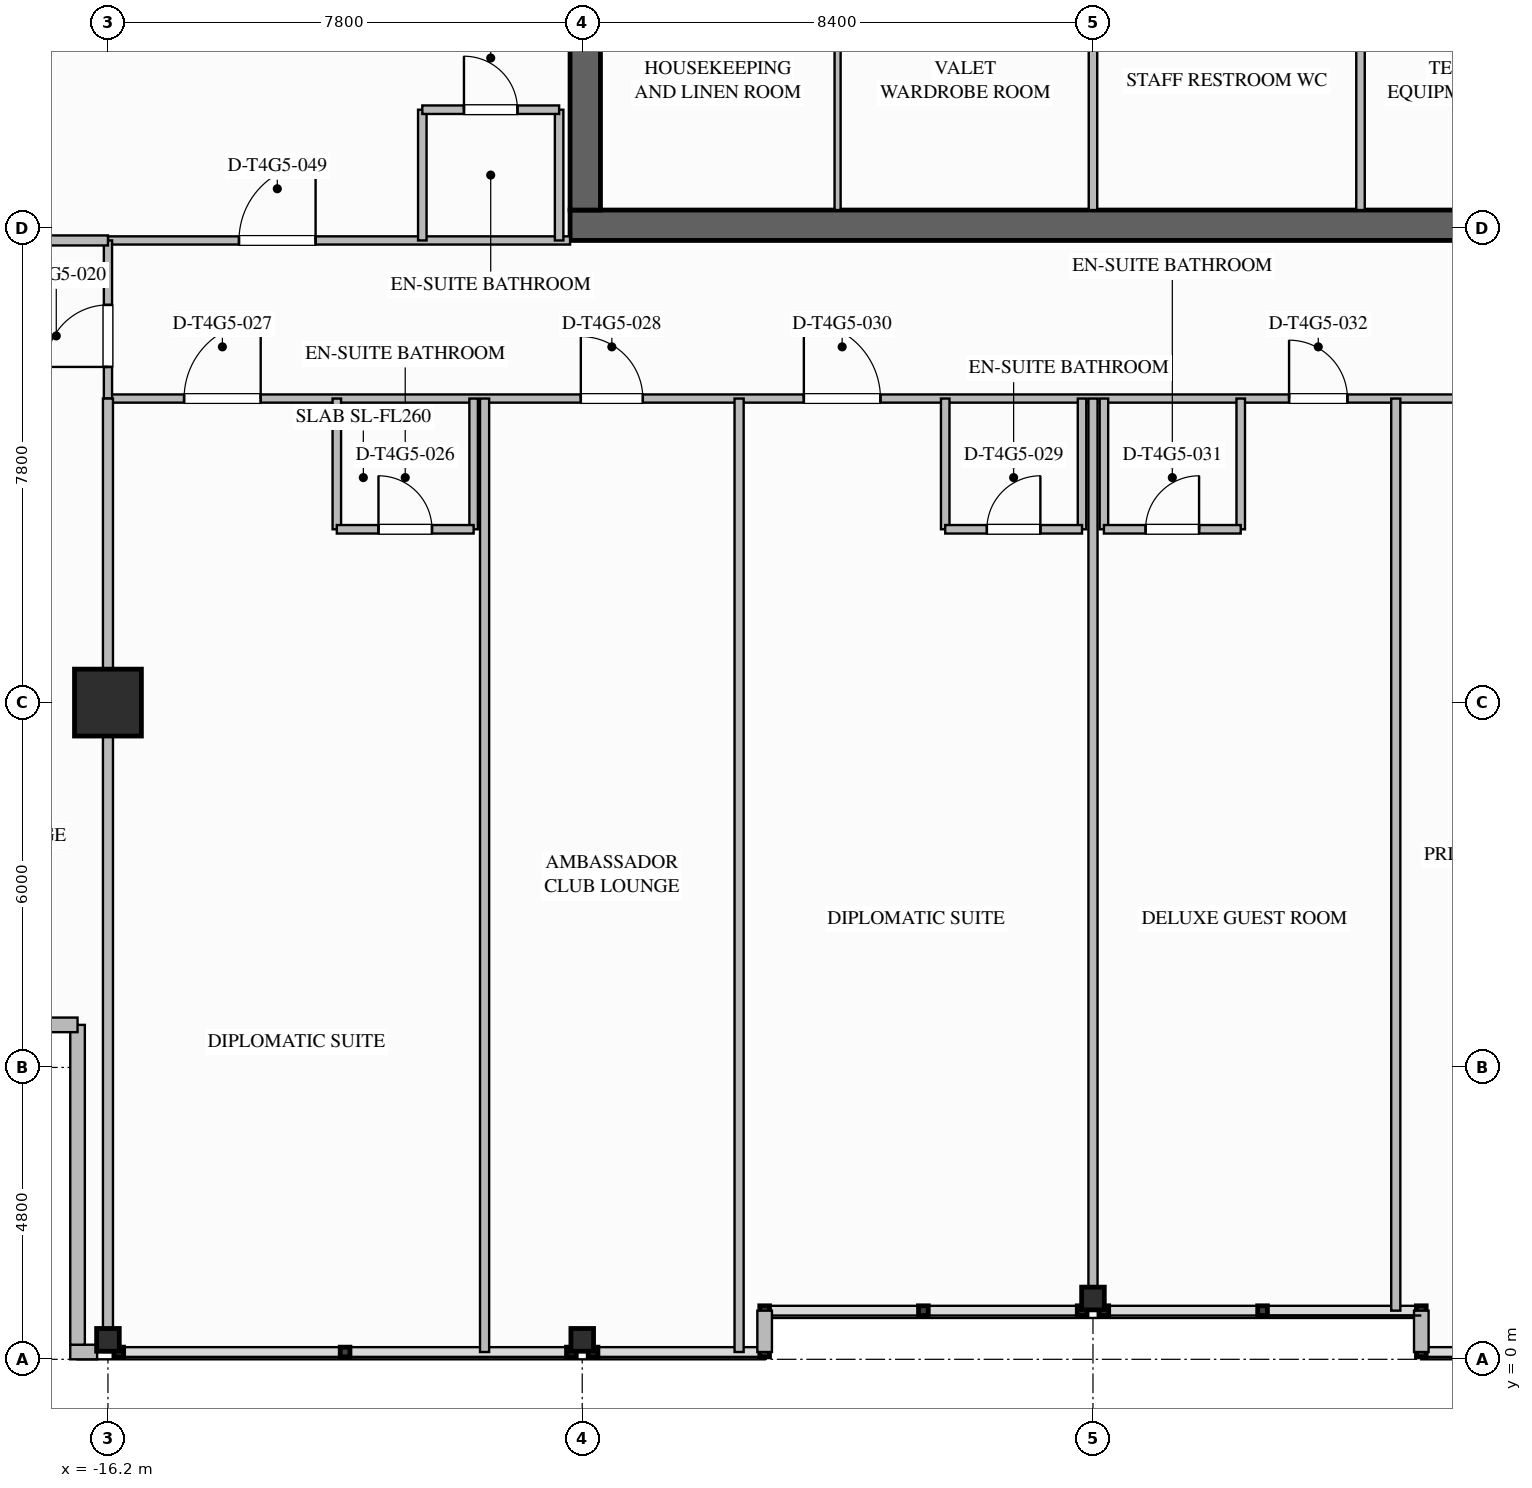
"""IFC4 building model, lengths in metres.
Left out: names, types, materials, properties, quantities, classifications, styles, units other than length and angle.
Written with IfcOpenShell. Run it as: python <this file> out.ifc"""

import sys

from ifc_helpers import new_model, si_unit, direction, frame, frame_2d, origin, origin_2d, place, context, subcontext, project, spatial, rectangle, i_section, extrude, element, fill, save


model = new_model("IFC4")
c1 = context("Model", 3, precision=1e-05, world=origin(), true_north=direction((0.0, 1.0)))
c2 = subcontext(c1, "Body", "Model", "MODEL_VIEW")
j1 = project(units=[si_unit("LENGTHUNIT", "METRE"), si_unit("PLANEANGLEUNIT", "RADIAN")], contexts=[c1])
p1 = place(None, origin())
s1 = spatial("IfcSite", under=j1, at=p1, CompositionType="ELEMENT")
p2 = place(p1, origin())
s2 = spatial("IfcBuilding", under=s1, at=p2, CompositionType="ELEMENT")
p3 = place(p2, frame((0.0, 0.0, 248.3)))
s3 = spatial("IfcBuildingStorey", under=s2, at=p3, CompositionType="ELEMENT", Elevation=248.3)
p4 = place(p3, frame((8.6, 18.65, 0.0), z_axis=(0.0, 0.0, 1.0), x_axis=(-1.0, 0.0, 0.0)))
e1 = element("IfcWall", 1, at=p4, inside=s3, PredefinedType="SHEAR", context=c2, shape_type="SweptSolid", body=[
    extrude(rectangle(XDim=17.2, YDim=0.5, at=frame_2d((8.6, 0.0))), origin(), (0.0, 0.0, 1.0), 3.6),
])
p5 = place(p3, frame((-8.35, 18.9, 0.0), z_axis=(0.0, 0.0, 1.0), x_axis=(0.0, 1.0, 0.0)))
e2 = element("IfcWall", 2, at=p5, inside=s3, PredefinedType="SHEAR", context=c2, shape_type="SweptSolid", body=[
    extrude(rectangle(XDim=16.2, YDim=0.5, at=frame_2d((8.1, 0.0))), origin(), (0.0, 0.0, 1.0), 3.6),
])
p6 = place(p3, frame((-16.2, 10.8, 0.0), z_axis=(0.0, 0.0, 1.0), x_axis=(1.0, 0.0, 0.0)))
e3 = element("IfcColumn", 3, at=p6, inside=s3, PredefinedType="COLUMN", context=c2, shape_type="SweptSolid", body=[
    extrude(rectangle(XDim=1.1, YDim=1.1, at=origin_2d()), origin(), (0.0, 0.0, 1.0), 3.6),
])
for number, where, z_axis, x_axis in (
    (4, (-16.2, 0.32, 0.0), (0.0, 0.0, 1.0), (0.0, 1.0, 0.0)),
    (5, (-8.4, 0.32, 0.0), (0.0, 0.0, 1.0), (0.0, 1.0, 0.0)),
    (6, (0.0, 1.0, 0.0), (0.0, 0.0, 1.0), (0.0, 1.0, 0.0)),
):
    element("IfcColumn", number, at=place(p3, frame(where, z_axis=z_axis, x_axis=x_axis)), inside=s3, PredefinedType="COLUMN", context=c2, shape_type="SweptSolid", body=[
        extrude(i_section(OverallWidth=0.374, OverallDepth=0.372, WebThickness=0.016, FlangeThickness=0.026, FilletRadius=0.025, at=origin_2d()), origin(), (0.0, 0.0, 1.0), 3.597),
    ])
p7 = place(p3, frame((-16.378, 0.12, 0.0), z_axis=(0.0, 0.0, 1.0), x_axis=(-1.0, 0.0, 0.0)))
e7 = element("IfcWall", 7, at=p7, inside=s3, PredefinedType="STANDARD", context=c2, shape_type="SweptSolid", body=[
    extrude(rectangle(XDim=0.442, YDim=0.24, at=frame_2d((0.221, 0.0))), origin(), (0.0, 0.0, 1.0), 3.34),
])
p8 = place(p3, frame((-16.7, 0.24, 0.0), z_axis=(0.0, 0.0, 1.0), x_axis=(0.0, 1.0, 0.0)))
e8 = element("IfcWall", 8, at=p8, inside=s3, PredefinedType="STANDARD", context=c2, shape_type="SweptSolid", body=[
    extrude(rectangle(XDim=5.26, YDim=0.24, at=frame_2d((2.63, 0.0))), origin(), (0.0, 0.0, 1.0), 3.34),
])
p9 = place(p3, frame((-16.7, 5.5, 0.0), z_axis=(0.0, 0.0, 1.0), x_axis=(-1.0, 0.0, 0.0)))
e9 = element("IfcWall", 9, at=p9, inside=s3, PredefinedType="STANDARD", context=c2, shape_type="SweptSolid", body=[
    extrude(rectangle(XDim=5.38, YDim=0.24, at=frame_2d((2.69, 0.0))), origin(), (0.0, 0.0, 1.0), 3.34),
])
for number, where, z_axis, x_axis in (
    (10, (5.4, 0.12, 0.0), (0.0, 0.0, 1.0), (0.0, 1.0, 0.0)),
    (11, (-5.4, 0.8, 0.0), (0.0, 0.0, 1.0), (0.0, -1.0, 0.0)),
):
    element("IfcWall", number, at=place(p3, frame(where, z_axis=z_axis, x_axis=x_axis)), inside=s3, PredefinedType="STANDARD", context=c2, shape_type="SweptSolid", body=[
        extrude(rectangle(XDim=0.68, YDim=0.24, at=frame_2d((0.34, 0.0))), origin(), (0.0, 0.0, 1.0), 3.34),
    ])
p10 = place(p3, frame((-4.2, 18.9, 0.0), z_axis=(0.0, 0.0, 1.0), x_axis=(0.0, 1.0, 0.0)))
e12 = element("IfcWall", 12, at=p10, inside=s3, PredefinedType="PARTITIONING", context=c2, shape_type="SweptSolid", body=[
    extrude(rectangle(XDim=4.3, YDim=0.1, at=frame_2d((2.15, 0.0))), origin(), (0.0, 0.0, 1.0), 3.34),
])
for number, where, z_axis, x_axis in (
    (13, (0.0, 18.9, 0.0), (0.0, 0.0, 1.0), (0.0, 1.0, 0.0)),
    (14, (4.4, 18.9, 0.0), (0.0, 0.0, 1.0), (0.0, 1.0, 0.0)),
):
    element("IfcWall", number, at=place(p3, frame(where, z_axis=z_axis, x_axis=x_axis)), inside=s3, PredefinedType="PLUMBINGWALL", context=c2, shape_type="SweptSolid", body=[
        extrude(rectangle(XDim=4.3, YDim=0.14, at=frame_2d((2.15, 0.0))), origin(), (0.0, 0.0, 1.0), 3.34),
    ])
p11 = place(p3, frame((-16.2, 15.8, 0.0), z_axis=(0.0, 0.0, 1.0), x_axis=(1.0, 0.0, 0.0)))
e15 = element("IfcWall", 15, at=p11, inside=s3, PredefinedType="PARTITIONING", context=c2, shape_type="SweptSolid", body=[
    extrude(rectangle(XDim=38.28, YDim=0.135, at=frame_2d((19.14, 0.0))), origin(), (0.0, 0.0, 1.0), 3.34),
])
p12 = place(p11, frame((33.355, 0.0, 0.0)))
e16 = element("IfcOpeningElement", 16, at=p12, cuts=e15, PredefinedType="OPENING", context=c2, shape_type="SweptSolid", body=[
    extrude(rectangle(XDim=1.26, YDim=2.2, at=frame_2d((0.63, 1.1))), frame((0.0, 0.077, 0.0), z_axis=(0.0, -1.0, 0.0), x_axis=(1.0, 0.0, 0.0)), (0.0, 0.0, 1.0), 0.155),
])
p13 = place(p11, frame((1.252, 0.0, 0.0)))
e17 = element("IfcOpeningElement", 17, at=p13, cuts=e15, PredefinedType="OPENING", context=c2, shape_type="SweptSolid", body=[
    extrude(rectangle(XDim=1.26, YDim=2.2, at=frame_2d((0.63, 1.1))), frame((0.0, 0.077, 0.0), z_axis=(0.0, -1.0, 0.0), x_axis=(1.0, 0.0, 0.0)), (0.0, 0.0, 1.0), 0.155),
])
p14 = place(p11, frame((7.777, 0.0, 0.0)))
e18 = element("IfcOpeningElement", 18, at=p14, cuts=e15, PredefinedType="OPENING", context=c2, shape_type="SweptSolid", body=[
    extrude(rectangle(XDim=1.02, YDim=2.15, at=frame_2d((0.51, 1.075))), frame((0.0, 0.077, 0.0), z_axis=(0.0, -1.0, 0.0), x_axis=(1.0, 0.0, 0.0)), (0.0, 0.0, 1.0), 0.155),
])
p15 = place(p11, frame((11.445, 0.0, 0.0)))
e19 = element("IfcOpeningElement", 19, at=p15, cuts=e15, PredefinedType="OPENING", context=c2, shape_type="SweptSolid", body=[
    extrude(rectangle(XDim=1.26, YDim=2.2, at=frame_2d((0.63, 1.1))), frame((0.0, 0.077, 0.0), z_axis=(0.0, -1.0, 0.0), x_axis=(1.0, 0.0, 0.0)), (0.0, 0.0, 1.0), 0.155),
])
p16 = place(p11, frame((19.425, 0.0, 0.0)))
e20 = element("IfcOpeningElement", 20, at=p16, cuts=e15, PredefinedType="OPENING", context=c2, shape_type="SweptSolid", body=[
    extrude(rectangle(XDim=0.96, YDim=2.15, at=frame_2d((0.48, 1.075))), frame((0.0, 0.077, 0.0), z_axis=(0.0, -1.0, 0.0), x_axis=(1.0, 0.0, 0.0)), (0.0, 0.0, 1.0), 0.155),
])
p17 = place(p11, frame((23.183, 0.0, 0.0)))
e21 = element("IfcOpeningElement", 21, at=p17, cuts=e15, PredefinedType="OPENING", context=c2, shape_type="SweptSolid", body=[
    extrude(rectangle(XDim=1.02, YDim=2.15, at=frame_2d((0.51, 1.075))), frame((0.0, 0.077, 0.0), z_axis=(0.0, -1.0, 0.0), x_axis=(1.0, 0.0, 0.0)), (0.0, 0.0, 1.0), 0.155),
])
p18 = place(p11, frame((29.888, 0.0, 0.0)))
e22 = element("IfcOpeningElement", 22, at=p18, cuts=e15, PredefinedType="OPENING", context=c2, shape_type="SweptSolid", body=[
    extrude(rectangle(XDim=1.26, YDim=2.2, at=frame_2d((0.63, 1.1))), frame((0.0, 0.077, 0.0), z_axis=(0.0, -1.0, 0.0), x_axis=(1.0, 0.0, 0.0)), (0.0, 0.0, 1.0), 0.155),
])
p19 = place(p3, frame((-16.2, 18.4, 0.0), z_axis=(0.0, 0.0, 1.0), x_axis=(1.0, 0.0, 0.0)))
e23 = element("IfcWall", 23, at=p19, inside=s3, PredefinedType="PARTITIONING", context=c2, shape_type="SweptSolid", body=[
    extrude(rectangle(XDim=7.6, YDim=0.135, at=frame_2d((3.8, 0.0))), origin(), (0.0, 0.0, 1.0), 2.717),
])
p20 = place(p19, frame((2.155, 0.0, 0.0)))
e24 = element("IfcOpeningElement", 24, at=p20, cuts=e23, PredefinedType="OPENING", context=c2, shape_type="SweptSolid", body=[
    extrude(rectangle(XDim=1.26, YDim=2.2, at=frame_2d((0.63, 1.1))), frame((0.0, 0.077, 0.0), z_axis=(0.0, -1.0, 0.0), x_axis=(1.0, 0.0, 0.0)), (0.0, 0.0, 1.0), 0.155),
])
p21 = place(p3, frame((-16.2, 15.8, 0.0), z_axis=(0.0, 0.0, 1.0), x_axis=(0.0, 1.0, 0.0)))
e25 = element("IfcWall", 25, at=p21, inside=s3, PredefinedType="PARTITIONING", context=c2, shape_type="SweptSolid", body=[
    extrude(rectangle(XDim=2.6, YDim=0.135, at=frame_2d((1.3, 0.0))), origin(), (0.0, 0.0, 1.0), 2.714),
])
p22 = place(p21, frame((0.52, 0.0, 0.0)))
e26 = element("IfcOpeningElement", 26, at=p22, cuts=e25, PredefinedType="OPENING", context=c2, shape_type="SweptSolid", body=[
    extrude(rectangle(XDim=1.02, YDim=2.15, at=frame_2d((0.51, 1.075))), frame((0.0, 0.077, 0.0), z_axis=(0.0, -1.0, 0.0), x_axis=(1.0, 0.0, 0.0)), (0.0, 0.0, 1.0), 0.155),
])
p23 = place(p3, frame((-16.2, 0.12, 0.0), z_axis=(0.0, 0.0, 1.0), x_axis=(0.0, 1.0, 0.0)))
e27 = element("IfcWall", 27, at=p23, inside=s3, PredefinedType="PARTITIONING", context=c2, shape_type="SweptSolid", body=[
    extrude(rectangle(XDim=15.68, YDim=0.165, at=frame_2d((7.84, 0.0))), origin(), (0.0, 0.0, 1.0), 2.714),
])
p24 = place(p3, frame((-22.08, 18.4, 0.0), z_axis=(0.0, 0.0, 1.0), x_axis=(1.0, 0.0, 0.0)))
e28 = element("IfcWall", 28, at=p24, inside=s3, PredefinedType="PARTITIONING", context=c2, shape_type="SweptSolid", body=[
    extrude(rectangle(XDim=5.88, YDim=0.165, at=frame_2d((2.94, 0.0))), origin(), (0.0, 0.0, 1.0), 2.714),
])
p25 = place(p3, frame((-12.436, 15.8, 0.0), z_axis=(0.0, 0.0, 1.0), x_axis=(0.0, -1.0, 0.0)))
e29 = element("IfcWall", 29, at=p25, inside=s3, PredefinedType="PLUMBINGWALL", context=c2, shape_type="SweptSolid", body=[
    extrude(rectangle(XDim=2.15, YDim=0.14, at=frame_2d((1.075, 0.0))), origin(), (0.0, 0.0, 1.0), 2.918),
])
p26 = place(p3, frame((-10.186, 15.8, 0.0), z_axis=(0.0, 0.0, 1.0), x_axis=(0.0, -1.0, 0.0)))
e30 = element("IfcWall", 30, at=p26, inside=s3, PredefinedType="PLUMBINGWALL", context=c2, shape_type="SweptSolid", body=[
    extrude(rectangle(XDim=2.15, YDim=0.14, at=frame_2d((1.075, 0.0))), origin(), (0.0, 0.0, 1.0), 3.34),
])
p27 = place(p3, frame((-12.436, 13.65, 0.0), z_axis=(0.0, 0.0, 1.0), x_axis=(1.0, 0.0, 0.0)))
e31 = element("IfcWall", 31, at=p27, inside=s3, PredefinedType="PLUMBINGWALL", context=c2, shape_type="SweptSolid", body=[
    extrude(rectangle(XDim=2.25, YDim=0.14, at=frame_2d((1.125, 0.0))), origin(), (0.0, 0.0, 1.0), 3.34),
])
p28 = place(p27, frame((0.685, 0.0, 0.0)))
e32 = element("IfcOpeningElement", 32, at=p28, cuts=e31, PredefinedType="OPENING", context=c2, shape_type="SweptSolid", body=[
    extrude(rectangle(XDim=0.88, YDim=2.1, at=frame_2d((0.44, 1.05))), frame((0.0, 0.08, 0.0), z_axis=(0.0, -1.0, 0.0), x_axis=(1.0, 0.0, 0.0)), (0.0, 0.0, 1.0), 0.16),
])
for number, where, z_axis, x_axis in (
    (33, (-10.006, 0.12, 0.0), (0.0, 0.0, 1.0), (0.0, 1.0, 0.0)),
    (34, (-5.82, 0.12, 0.0), (0.0, 0.0, 1.0), (0.0, 1.0, 0.0)),
):
    element("IfcWall", number, at=place(p3, frame(where, z_axis=z_axis, x_axis=x_axis)), inside=s3, PredefinedType="PARTITIONING", context=c2, shape_type="SweptSolid", body=[
        extrude(rectangle(XDim=15.68, YDim=0.15, at=frame_2d((7.84, 0.0))), origin(), (0.0, 0.0, 1.0), 3.34),
    ])
p29 = place(p3, frame((-2.43, 15.8, 0.0), z_axis=(0.0, 0.0, 1.0), x_axis=(0.0, -1.0, 0.0)))
e35 = element("IfcWall", 35, at=p29, inside=s3, PredefinedType="PLUMBINGWALL", context=c2, shape_type="SweptSolid", body=[
    extrude(rectangle(XDim=2.15, YDim=0.14, at=frame_2d((1.075, 0.0))), origin(), (0.0, 0.0, 1.0), 3.34),
])
p30 = place(p3, frame((-0.18, 15.8, 0.0), z_axis=(0.0, 0.0, 1.0), x_axis=(0.0, -1.0, 0.0)))
e36 = element("IfcWall", 36, at=p30, inside=s3, PredefinedType="PLUMBINGWALL", context=c2, shape_type="SweptSolid", body=[
    extrude(rectangle(XDim=2.15, YDim=0.14, at=frame_2d((1.075, 0.0))), origin(), (0.0, 0.0, 1.0), 2.717),
])
p31 = place(p3, frame((-2.43, 13.65, 0.0), z_axis=(0.0, 0.0, 1.0), x_axis=(1.0, 0.0, 0.0)))
e37 = element("IfcWall", 37, at=p31, inside=s3, PredefinedType="PLUMBINGWALL", context=c2, shape_type="SweptSolid", body=[
    extrude(rectangle(XDim=2.25, YDim=0.14, at=frame_2d((1.125, 0.0))), origin(), (0.0, 0.0, 1.0), 3.34),
])
p32 = place(p31, frame((0.685, 0.0, 0.0)))
e38 = element("IfcOpeningElement", 38, at=p32, cuts=e37, PredefinedType="OPENING", context=c2, shape_type="SweptSolid", body=[
    extrude(rectangle(XDim=0.88, YDim=2.1, at=frame_2d((0.44, 1.05))), frame((0.0, 0.08, 0.0), z_axis=(0.0, -1.0, 0.0), x_axis=(1.0, 0.0, 0.0)), (0.0, 0.0, 1.0), 0.16),
])
p33 = place(p3, frame((0.0, 0.8, 0.0), z_axis=(0.0, 0.0, 1.0), x_axis=(0.0, 1.0, 0.0)))
e39 = element("IfcWall", 39, at=p33, inside=s3, PredefinedType="PARTITIONING", context=c2, shape_type="SweptSolid", body=[
    extrude(rectangle(XDim=15.0, YDim=0.15, at=frame_2d((7.5, 0.0))), origin(), (0.0, 0.0, 1.0), 2.714),
])
p34 = place(p3, frame((0.18, 15.8, 0.0), z_axis=(0.0, 0.0, 1.0), x_axis=(0.0, -1.0, 0.0)))
e40 = element("IfcWall", 40, at=p34, inside=s3, PredefinedType="PLUMBINGWALL", context=c2, shape_type="SweptSolid", body=[
    extrude(rectangle(XDim=2.15, YDim=0.14, at=frame_2d((1.075, 0.0))), origin(), (0.0, 0.0, 1.0), 2.717),
])
p35 = place(p3, frame((2.43, 15.8, 0.0), z_axis=(0.0, 0.0, 1.0), x_axis=(0.0, -1.0, 0.0)))
e41 = element("IfcWall", 41, at=p35, inside=s3, PredefinedType="PLUMBINGWALL", context=c2, shape_type="SweptSolid", body=[
    extrude(rectangle(XDim=2.15, YDim=0.14, at=frame_2d((1.075, 0.0))), origin(), (0.0, 0.0, 1.0), 3.34),
])
p36 = place(p3, frame((0.18, 13.65, 0.0), z_axis=(0.0, 0.0, 1.0), x_axis=(1.0, 0.0, 0.0)))
e42 = element("IfcWall", 42, at=p36, inside=s3, PredefinedType="PLUMBINGWALL", context=c2, shape_type="SweptSolid", body=[
    extrude(rectangle(XDim=2.25, YDim=0.14, at=frame_2d((1.125, 0.0))), origin(), (0.0, 0.0, 1.0), 3.34),
])
p37 = place(p36, frame((0.685, 0.0, 0.0)))
e43 = element("IfcOpeningElement", 43, at=p37, cuts=e42, PredefinedType="OPENING", context=c2, shape_type="SweptSolid", body=[
    extrude(rectangle(XDim=0.88, YDim=2.1, at=frame_2d((0.44, 1.05))), frame((0.0, 0.08, 0.0), z_axis=(0.0, -1.0, 0.0), x_axis=(1.0, 0.0, 0.0)), (0.0, 0.0, 1.0), 0.16),
])
p38 = place(p3, frame((4.98, 0.8, 0.0), z_axis=(0.0, 0.0, 1.0), x_axis=(0.0, 1.0, 0.0)))
e44 = element("IfcWall", 44, at=p38, inside=s3, PredefinedType="PARTITIONING", context=c2, shape_type="SweptSolid", body=[
    extrude(rectangle(XDim=15.0, YDim=0.15, at=frame_2d((7.5, 0.0))), origin(), (0.0, 0.0, 1.0), 3.34),
])
for number, where, z_axis, x_axis in (
    (45, (-11.03, 18.4, 0.0), (0.0, 0.0, 1.0), (0.0, 1.0, 0.0)),
    (46, (-8.78, 18.4, 0.0), (0.0, 0.0, 1.0), (0.0, 1.0, 0.0)),
):
    element("IfcWall", number, at=place(p3, frame(where, z_axis=z_axis, x_axis=x_axis)), inside=s3, PredefinedType="PLUMBINGWALL", context=c2, shape_type="SweptSolid", body=[
        extrude(rectangle(XDim=2.15, YDim=0.14, at=frame_2d((1.075, 0.0))), origin(), (0.0, 0.0, 1.0), 3.34),
    ])
p39 = place(p3, frame((-11.03, 20.55, 0.0), z_axis=(0.0, 0.0, 1.0), x_axis=(1.0, 0.0, 0.0)))
e47 = element("IfcWall", 47, at=p39, inside=s3, PredefinedType="PLUMBINGWALL", context=c2, shape_type="SweptSolid", body=[
    extrude(rectangle(XDim=2.25, YDim=0.14, at=frame_2d((1.125, 0.0))), origin(), (0.0, 0.0, 1.0), 3.34),
])
p40 = place(p39, frame((0.685, 0.0, 0.0)))
e48 = element("IfcOpeningElement", 48, at=p40, cuts=e47, PredefinedType="OPENING", context=c2, shape_type="SweptSolid", body=[
    extrude(rectangle(XDim=0.88, YDim=2.1, at=frame_2d((0.44, 1.05))), frame((0.0, 0.08, 0.0), z_axis=(0.0, -1.0, 0.0), x_axis=(1.0, 0.0, 0.0)), (0.0, 0.0, 1.0), 0.16),
])
p41 = place(p22, origin())
e49 = element("IfcDoor", 49, at=p41, inside=s3, OperationType="SINGLE_SWING_LEFT", PredefinedType="DOOR", context=c2, shape_type="SweptSolid", body=[
    extrude(rectangle(XDim=1.02, YDim=2.15, at=frame_2d((0.51, 1.075))), frame((0.0, 0.025, 0.0), z_axis=(0.0, -1.0, 0.0), x_axis=(1.0, 0.0, 0.0)), (0.0, 0.0, 1.0), 0.05),
])
fill(e26, e49)
p42 = place(p28, origin())
e50 = element("IfcDoor", 50, at=p42, inside=s3, OperationType="SINGLE_SWING_LEFT", PredefinedType="DOOR", context=c2, shape_type="SweptSolid", body=[
    extrude(rectangle(XDim=0.88, YDim=2.1, at=frame_2d((0.44, 1.05))), frame((0.0, 0.025, 0.0), z_axis=(0.0, -1.0, 0.0), x_axis=(1.0, 0.0, 0.0)), (0.0, 0.0, 1.0), 0.05),
])
fill(e32, e50)
p43 = place(p13, origin())
e51 = element("IfcDoor", 51, at=p43, inside=s3, OperationType="SINGLE_SWING_RIGHT", PredefinedType="DOOR", context=c2, shape_type="SweptSolid", body=[
    extrude(rectangle(XDim=1.26, YDim=2.2, at=frame_2d((0.63, 1.1))), frame((0.0, 0.025, 0.0), z_axis=(0.0, -1.0, 0.0), x_axis=(1.0, 0.0, 0.0)), (0.0, 0.0, 1.0), 0.05),
])
fill(e17, e51)
p44 = place(p14, origin())
e52 = element("IfcDoor", 52, at=p44, inside=s3, OperationType="SINGLE_SWING_LEFT", PredefinedType="DOOR", context=c2, shape_type="SweptSolid", body=[
    extrude(rectangle(XDim=1.02, YDim=2.15, at=frame_2d((0.51, 1.075))), frame((0.0, 0.025, 0.0), z_axis=(0.0, -1.0, 0.0), x_axis=(1.0, 0.0, 0.0)), (0.0, 0.0, 1.0), 0.05),
])
fill(e18, e52)
p45 = place(p32, origin())
e53 = element("IfcDoor", 53, at=p45, inside=s3, OperationType="SINGLE_SWING_RIGHT", PredefinedType="DOOR", context=c2, shape_type="SweptSolid", body=[
    extrude(rectangle(XDim=0.88, YDim=2.1, at=frame_2d((0.44, 1.05))), frame((0.0, 0.025, 0.0), z_axis=(0.0, -1.0, 0.0), x_axis=(1.0, 0.0, 0.0)), (0.0, 0.0, 1.0), 0.05),
])
fill(e38, e53)
p46 = place(p15, origin())
e54 = element("IfcDoor", 54, at=p46, inside=s3, OperationType="SINGLE_SWING_LEFT", PredefinedType="DOOR", context=c2, shape_type="SweptSolid", body=[
    extrude(rectangle(XDim=1.26, YDim=2.2, at=frame_2d((0.63, 1.1))), frame((0.0, 0.025, 0.0), z_axis=(0.0, -1.0, 0.0), x_axis=(1.0, 0.0, 0.0)), (0.0, 0.0, 1.0), 0.05),
])
fill(e19, e54)
p47 = place(p37, origin())
e55 = element("IfcDoor", 55, at=p47, inside=s3, OperationType="SINGLE_SWING_RIGHT", PredefinedType="DOOR", context=c2, shape_type="SweptSolid", body=[
    extrude(rectangle(XDim=0.88, YDim=2.1, at=frame_2d((0.44, 1.05))), frame((0.0, 0.025, 0.0), z_axis=(0.0, -1.0, 0.0), x_axis=(1.0, 0.0, 0.0)), (0.0, 0.0, 1.0), 0.05),
])
fill(e43, e55)
p48 = place(p16, origin())
e56 = element("IfcDoor", 56, at=p48, inside=s3, OperationType="SINGLE_SWING_LEFT", PredefinedType="DOOR", context=c2, shape_type="SweptSolid", body=[
    extrude(rectangle(XDim=0.96, YDim=2.15, at=frame_2d((0.48, 1.075))), frame((0.0, 0.025, 0.0), z_axis=(0.0, -1.0, 0.0), x_axis=(1.0, 0.0, 0.0)), (0.0, 0.0, 1.0), 0.05),
])
fill(e20, e56)
p49 = place(p40, origin())
e57 = element("IfcDoor", 57, at=p49, inside=s3, OperationType="SINGLE_SWING_LEFT", PredefinedType="DOOR", context=c2, shape_type="SweptSolid", body=[
    extrude(rectangle(XDim=0.88, YDim=2.1, at=frame_2d((0.44, 1.05))), frame((0.0, 0.025, 0.0), z_axis=(0.0, -1.0, 0.0), x_axis=(1.0, 0.0, 0.0)), (0.0, 0.0, 1.0), 0.05),
])
fill(e48, e57)
p50 = place(p20, origin())
e58 = element("IfcDoor", 58, at=p50, inside=s3, OperationType="SINGLE_SWING_RIGHT", PredefinedType="DOOR", context=c2, shape_type="SweptSolid", body=[
    extrude(rectangle(XDim=1.26, YDim=2.2, at=frame_2d((0.63, 1.1))), frame((0.0, 0.025, 0.0), z_axis=(0.0, -1.0, 0.0), x_axis=(1.0, 0.0, 0.0)), (0.0, 0.0, 1.0), 0.05),
])
fill(e24, e58)
save(model, sys.argv[1])
